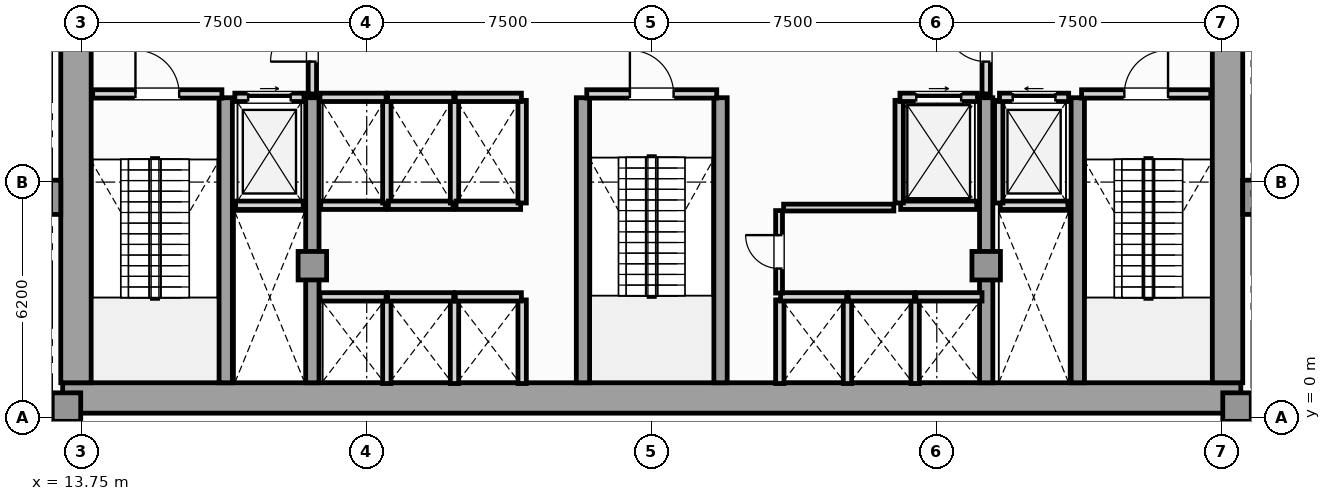
"""IFC4 building model, lengths in metres.
Left out: names, types, materials, properties, quantities, classifications, styles, units other than length and angle.
Written with IfcOpenShell. Run it as: python <this file> out.ifc"""

import sys

from ifc_helpers import new_model, si_unit, direction, frame, frame_2d, origin, origin_2d, place, context, subcontext, project, spatial, rectangle, extrude, element, fill, save


model = new_model("IFC4")
c1 = context("Model", 3, precision=1e-05, world=origin(), true_north=direction((0.0, 1.0)))
c2 = subcontext(c1, "Body", "Model", "MODEL_VIEW")
j1 = project(units=[si_unit("LENGTHUNIT", "METRE"), si_unit("PLANEANGLEUNIT", "RADIAN")], contexts=[c1])
p1 = place(None, origin())
s1 = spatial("IfcSite", under=j1, at=p1, CompositionType="ELEMENT")
p2 = place(p1, origin())
s2 = spatial("IfcBuilding", under=s1, at=p2, CompositionType="ELEMENT")
p3 = place(p2, frame((0.0, 0.0, 24.6)))
s3 = spatial("IfcBuildingStorey", under=s2, at=p3, CompositionType="ELEMENT", Elevation=24.6)
p4 = place(p3, frame((13.25, 0.52, 0.0), z_axis=(0.0, 0.0, 1.0), x_axis=(1.0, 0.0, 0.0)))
e1 = element("IfcWall", 1, at=p4, inside=s3, PredefinedType="SHEAR", context=c2, shape_type="SweptSolid", body=[
    extrude(rectangle(XDim=31.0, YDim=0.8, at=frame_2d((15.5, 0.0))), origin(), (0.0, 0.0, 1.0), 4.95),
])
for number, where, z_axis, x_axis in (
    (2, (13.6, 0.92, 0.0), (0.0, 0.0, 1.0), (0.0, 1.0, 0.0)),
    (3, (43.9, 0.92, 0.0), (0.0, 0.0, 1.0), (0.0, 1.0, 0.0)),
):
    element("IfcWall", number, at=place(p3, frame(where, z_axis=z_axis, x_axis=x_axis)), inside=s3, PredefinedType="SHEAR", context=c2, shape_type="SweptSolid", body=[
        extrude(rectangle(XDim=10.53, YDim=0.8, at=frame_2d((5.265, 0.0))), origin(), (0.0, 0.0, 1.0), 4.95),
    ])
for number, where, z_axis, x_axis in (
    (4, (17.54, 0.92, 0.0), (0.0, 0.0, 1.0), (0.0, 1.0, 0.0)),
    (5, (19.82, 0.92, 0.0), (0.0, 0.0, 1.0), (0.0, 1.0, 0.0)),
    (6, (26.94, 0.92, 0.0), (0.0, 0.0, 1.0), (0.0, 1.0, 0.0)),
    (7, (30.56, 0.92, 0.0), (0.0, 0.0, 1.0), (0.0, 1.0, 0.0)),
    (8, (37.55, 0.92, 0.0), (0.0, 0.0, 1.0), (0.0, 1.0, 0.0)),
    (9, (39.96, 0.92, 0.0), (0.0, 0.0, 1.0), (0.0, 1.0, 0.0)),
):
    element("IfcWall", number, at=place(p3, frame(where, z_axis=z_axis, x_axis=x_axis)), inside=s3, PredefinedType="SHEAR", context=c2, shape_type="SweptSolid", body=[
        extrude(rectangle(XDim=7.5, YDim=0.35, at=frame_2d((3.75, 0.0))), origin(), (0.0, 0.0, 1.0), 4.95),
    ])
for number, where, z_axis, x_axis in (
    (10, (12.9, 5.8, 0.0), (0.0, 0.0, 1.0), (1.0, 0.0, 0.0)),
    (11, (44.6, 5.8, 0.0), (0.0, 0.0, 1.0), (1.0, 0.0, 0.0)),
):
    element("IfcColumn", number, at=place(p3, frame(where, z_axis=z_axis, x_axis=x_axis)), inside=s3, PredefinedType="PILASTER", context=c2, shape_type="SweptSolid", body=[
        extrude(rectangle(XDim=0.6, YDim=0.9, at=origin_2d()), origin(), (0.0, 0.0, 1.0), 5.2),
    ])
for number, where, z_axis, x_axis in (
    (12, (13.35, 0.28, 0.0), (0.0, 0.0, 1.0), (1.0, 0.0, 0.0)),
    (13, (44.15, 0.28, 0.0), (0.0, 0.0, 1.0), (1.0, 0.0, 0.0)),
    (14, (19.82, 4.0, 0.0), (0.0, 0.0, 1.0), (1.0, 0.0, 0.0)),
    (15, (37.55, 4.0, 0.0), (0.0, 0.0, 1.0), (1.0, 0.0, 0.0)),
):
    element("IfcColumn", number, at=place(p3, frame(where, z_axis=z_axis, x_axis=x_axis)), inside=s3, PredefinedType="COLUMN", context=c2, shape_type="SweptSolid", body=[
        extrude(rectangle(XDim=0.75, YDim=0.75, at=origin_2d()), origin(), (0.0, 0.0, 1.0), 5.2),
    ])
p5 = place(p3, frame((17.8, 5.59, 0.0), z_axis=(0.0, 0.0, 1.0), x_axis=(1.0, 0.0, 0.0)))
e16 = element("IfcWall", 16, at=p5, inside=s3, PredefinedType="SOLIDWALL", context=c2, shape_type="SweptSolid", body=[
    extrude(rectangle(XDim=1.78, YDim=0.22, at=frame_2d((0.89, 0.0))), origin(), (0.0, 0.0, 1.0), 4.95),
])
p6 = place(p3, frame((17.78, 8.43, 0.0), z_axis=(0.0, 0.0, 1.0), x_axis=(1.0, 0.0, 0.0)))
e17 = element("IfcWall", 17, at=p6, inside=s3, PredefinedType="SOLIDWALL", context=c2, shape_type="SweptSolid", body=[
    extrude(rectangle(XDim=1.82, YDim=0.22, at=frame_2d((0.91, 0.0))), origin(), (0.0, 0.0, 1.0), 4.95),
])
p7 = place(p6, frame((0.35, 0.0, 0.0)))
e18 = element("IfcOpeningElement", 18, at=p7, cuts=e17, PredefinedType="OPENING", context=c2, shape_type="SweptSolid", body=[
    extrude(rectangle(XDim=1.12, YDim=2.25, at=frame_2d((0.56, 1.125))), frame((0.0, 0.12, 0.0), z_axis=(0.0, -1.0, 0.0), x_axis=(1.0, 0.0, 0.0)), (0.0, 0.0, 1.0), 0.24),
])
p8 = place(p3, frame((37.92, 5.59, 0.0), z_axis=(0.0, 0.0, 1.0), x_axis=(1.0, 0.0, 0.0)))
e19 = element("IfcWall", 19, at=p8, inside=s3, PredefinedType="SOLIDWALL", context=c2, shape_type="SweptSolid", body=[
    extrude(rectangle(XDim=1.78, YDim=0.22, at=frame_2d((0.89, 0.0))), origin(), (0.0, 0.0, 1.0), 4.95),
])
p9 = place(p3, frame((37.88, 5.65, 0.0), z_axis=(0.0, 0.0, 1.0), x_axis=(0.0, 1.0, 0.0)))
e20 = element("IfcWall", 20, at=p9, inside=s3, PredefinedType="SOLIDWALL", context=c2, shape_type="SweptSolid", body=[
    extrude(rectangle(XDim=2.7, YDim=0.22, at=frame_2d((1.35, 0.0))), origin(), (0.0, 0.0, 1.0), 4.95),
])
p10 = place(p3, frame((37.9, 8.43, 0.0), z_axis=(0.0, 0.0, 1.0), x_axis=(1.0, 0.0, 0.0)))
e21 = element("IfcWall", 21, at=p10, inside=s3, PredefinedType="SOLIDWALL", context=c2, shape_type="SweptSolid", body=[
    extrude(rectangle(XDim=1.82, YDim=0.22, at=frame_2d((0.91, 0.0))), origin(), (0.0, 0.0, 1.0), 4.95),
])
p11 = place(p10, frame((0.35, 0.0, 0.0)))
e22 = element("IfcOpeningElement", 22, at=p11, cuts=e21, PredefinedType="OPENING", context=c2, shape_type="SweptSolid", body=[
    extrude(rectangle(XDim=1.12, YDim=2.25, at=frame_2d((0.56, 1.125))), frame((0.0, 0.12, 0.0), z_axis=(0.0, -1.0, 0.0), x_axis=(1.0, 0.0, 0.0)), (0.0, 0.0, 1.0), 0.24),
])
p12 = place(p3, frame((35.3, 5.59, 0.0), z_axis=(0.0, 0.0, 1.0), x_axis=(1.0, 0.0, 0.0)))
e23 = element("IfcWall", 23, at=p12, inside=s3, PredefinedType="SOLIDWALL", context=c2, shape_type="SweptSolid", body=[
    extrude(rectangle(XDim=2.0, YDim=0.22, at=frame_2d((1.0, 0.0))), origin(), (0.0, 0.0, 1.0), 4.95),
])
p13 = place(p3, frame((35.26, 5.65, 0.0), z_axis=(0.0, 0.0, 1.0), x_axis=(0.0, 1.0, 0.0)))
e24 = element("IfcWall", 24, at=p13, inside=s3, PredefinedType="SOLIDWALL", context=c2, shape_type="SweptSolid", body=[
    extrude(rectangle(XDim=2.7, YDim=0.22, at=frame_2d((1.35, 0.0))), origin(), (0.0, 0.0, 1.0), 4.95),
])
p14 = place(p3, frame((35.28, 8.43, 0.0), z_axis=(0.0, 0.0, 1.0), x_axis=(1.0, 0.0, 0.0)))
e25 = element("IfcWall", 25, at=p14, inside=s3, PredefinedType="SOLIDWALL", context=c2, shape_type="SweptSolid", body=[
    extrude(rectangle(XDim=2.04, YDim=0.22, at=frame_2d((1.02, 0.0))), origin(), (0.0, 0.0, 1.0), 4.95),
])
p15 = place(p14, frame((0.43, 0.0, 0.0)))
e26 = element("IfcOpeningElement", 26, at=p15, cuts=e25, PredefinedType="OPENING", context=c2, shape_type="SweptSolid", body=[
    extrude(rectangle(XDim=1.18, YDim=2.2, at=frame_2d((0.59, 1.1))), frame((0.0, 0.12, 0.0), z_axis=(0.0, -1.0, 0.0), x_axis=(1.0, 0.0, 0.0)), (0.0, 0.0, 1.0), 0.24),
])
p16 = place(p3, frame((21.78, 0.9, 0.0), z_axis=(0.0, 0.0, 1.0), x_axis=(0.0, 1.0, 0.0)))
e27 = element("IfcWall", 27, at=p16, inside=s3, PredefinedType="SOLIDWALL", context=c2, shape_type="SweptSolid", body=[
    extrude(rectangle(XDim=2.2, YDim=0.22, at=frame_2d((1.1, 0.0))), origin(), (0.0, 0.0, 1.0), 4.95),
])
p17 = place(p3, frame((20.02, 3.18, 0.0), z_axis=(0.0, 0.0, 1.0), x_axis=(1.0, 0.0, 0.0)))
e28 = element("IfcWall", 28, at=p17, inside=s3, PredefinedType="SOLIDWALL", context=c2, shape_type="SweptSolid", body=[
    extrude(rectangle(XDim=1.74, YDim=0.22, at=frame_2d((0.87, 0.0))), origin(), (0.0, 0.0, 1.0), 4.95),
])
p18 = place(p3, frame((23.56, 0.9, 0.0), z_axis=(0.0, 0.0, 1.0), x_axis=(0.0, 1.0, 0.0)))
e29 = element("IfcWall", 29, at=p18, inside=s3, PredefinedType="SOLIDWALL", context=c2, shape_type="SweptSolid", body=[
    extrude(rectangle(XDim=2.2, YDim=0.22, at=frame_2d((1.1, 0.0))), origin(), (0.0, 0.0, 1.0), 4.95),
])
p19 = place(p3, frame((21.8, 3.18, 0.0), z_axis=(0.0, 0.0, 1.0), x_axis=(1.0, 0.0, 0.0)))
e30 = element("IfcWall", 30, at=p19, inside=s3, PredefinedType="SOLIDWALL", context=c2, shape_type="SweptSolid", body=[
    extrude(rectangle(XDim=1.74, YDim=0.22, at=frame_2d((0.87, 0.0))), origin(), (0.0, 0.0, 1.0), 4.95),
])
p20 = place(p3, frame((25.34, 0.9, 0.0), z_axis=(0.0, 0.0, 1.0), x_axis=(0.0, 1.0, 0.0)))
e31 = element("IfcWall", 31, at=p20, inside=s3, PredefinedType="SOLIDWALL", context=c2, shape_type="SweptSolid", body=[
    extrude(rectangle(XDim=2.2, YDim=0.22, at=frame_2d((1.1, 0.0))), origin(), (0.0, 0.0, 1.0), 4.95),
])
p21 = place(p3, frame((23.58, 3.18, 0.0), z_axis=(0.0, 0.0, 1.0), x_axis=(1.0, 0.0, 0.0)))
e32 = element("IfcWall", 32, at=p21, inside=s3, PredefinedType="SOLIDWALL", context=c2, shape_type="SweptSolid", body=[
    extrude(rectangle(XDim=1.74, YDim=0.22, at=frame_2d((0.87, 0.0))), origin(), (0.0, 0.0, 1.0), 4.95),
])
for number, where, z_axis, x_axis in (
    (33, (32.12, 0.9, 0.0), (0.0, 0.0, 1.0), (0.0, 1.0, 0.0)),
    (34, (33.9, 0.9, 0.0), (0.0, 0.0, 1.0), (0.0, 1.0, 0.0)),
):
    element("IfcWall", number, at=place(p3, frame(where, z_axis=z_axis, x_axis=x_axis)), inside=s3, PredefinedType="SOLIDWALL", context=c2, shape_type="SweptSolid", body=[
        extrude(rectangle(XDim=2.2, YDim=0.22, at=frame_2d((1.1, 0.0))), origin(), (0.0, 0.0, 1.0), 4.95),
    ])
p22 = place(p3, frame((32.14, 3.18, 0.0), z_axis=(0.0, 0.0, 1.0), x_axis=(1.0, 0.0, 0.0)))
e35 = element("IfcWall", 35, at=p22, inside=s3, PredefinedType="SOLIDWALL", context=c2, shape_type="SweptSolid", body=[
    extrude(rectangle(XDim=1.74, YDim=0.22, at=frame_2d((0.87, 0.0))), origin(), (0.0, 0.0, 1.0), 4.95),
])
p23 = place(p3, frame((35.68, 0.9, 0.0), z_axis=(0.0, 0.0, 1.0), x_axis=(0.0, 1.0, 0.0)))
e36 = element("IfcWall", 36, at=p23, inside=s3, PredefinedType="SOLIDWALL", context=c2, shape_type="SweptSolid", body=[
    extrude(rectangle(XDim=2.2, YDim=0.22, at=frame_2d((1.1, 0.0))), origin(), (0.0, 0.0, 1.0), 4.95),
])
for number, where, z_axis, x_axis in (
    (37, (33.92, 3.18, 0.0), (0.0, 0.0, 1.0), (1.0, 0.0, 0.0)),
    (38, (35.7, 3.18, 0.0), (0.0, 0.0, 1.0), (1.0, 0.0, 0.0)),
):
    element("IfcWall", number, at=place(p3, frame(where, z_axis=z_axis, x_axis=x_axis)), inside=s3, PredefinedType="SOLIDWALL", context=c2, shape_type="SweptSolid", body=[
        extrude(rectangle(XDim=1.74, YDim=0.22, at=frame_2d((0.87, 0.0))), origin(), (0.0, 0.0, 1.0), 4.95),
    ])
p24 = place(p3, frame((20.04, 5.59, 0.0), z_axis=(0.0, 0.0, 1.0), x_axis=(1.0, 0.0, 0.0)))
e39 = element("IfcWall", 39, at=p24, inside=s3, PredefinedType="SOLIDWALL", context=c2, shape_type="SweptSolid", body=[
    extrude(rectangle(XDim=1.7, YDim=0.22, at=frame_2d((0.85, 0.0))), origin(), (0.0, 0.0, 1.0), 4.95),
])
p25 = place(p3, frame((21.78, 5.65, 0.0), z_axis=(0.0, 0.0, 1.0), x_axis=(0.0, 1.0, 0.0)))
e40 = element("IfcWall", 40, at=p25, inside=s3, PredefinedType="SOLIDWALL", context=c2, shape_type="SweptSolid", body=[
    extrude(rectangle(XDim=2.7, YDim=0.22, at=frame_2d((1.35, 0.0))), origin(), (0.0, 0.0, 1.0), 4.95),
])
p26 = place(p3, frame((20.02, 8.43, 0.0), z_axis=(0.0, 0.0, 1.0), x_axis=(1.0, 0.0, 0.0)))
e41 = element("IfcWall", 41, at=p26, inside=s3, PredefinedType="SOLIDWALL", context=c2, shape_type="SweptSolid", body=[
    extrude(rectangle(XDim=1.74, YDim=0.22, at=frame_2d((0.87, 0.0))), origin(), (0.0, 0.0, 1.0), 4.95),
])
p27 = place(p3, frame((21.82, 5.59, 0.0), z_axis=(0.0, 0.0, 1.0), x_axis=(1.0, 0.0, 0.0)))
e42 = element("IfcWall", 42, at=p27, inside=s3, PredefinedType="SOLIDWALL", context=c2, shape_type="SweptSolid", body=[
    extrude(rectangle(XDim=1.7, YDim=0.22, at=frame_2d((0.85, 0.0))), origin(), (0.0, 0.0, 1.0), 4.95),
])
p28 = place(p3, frame((23.56, 5.65, 0.0), z_axis=(0.0, 0.0, 1.0), x_axis=(0.0, 1.0, 0.0)))
e43 = element("IfcWall", 43, at=p28, inside=s3, PredefinedType="SOLIDWALL", context=c2, shape_type="SweptSolid", body=[
    extrude(rectangle(XDim=2.7, YDim=0.22, at=frame_2d((1.35, 0.0))), origin(), (0.0, 0.0, 1.0), 4.95),
])
p29 = place(p3, frame((21.8, 8.43, 0.0), z_axis=(0.0, 0.0, 1.0), x_axis=(1.0, 0.0, 0.0)))
e44 = element("IfcWall", 44, at=p29, inside=s3, PredefinedType="SOLIDWALL", context=c2, shape_type="SweptSolid", body=[
    extrude(rectangle(XDim=1.74, YDim=0.22, at=frame_2d((0.87, 0.0))), origin(), (0.0, 0.0, 1.0), 4.95),
])
p30 = place(p3, frame((23.6, 5.59, 0.0), z_axis=(0.0, 0.0, 1.0), x_axis=(1.0, 0.0, 0.0)))
e45 = element("IfcWall", 45, at=p30, inside=s3, PredefinedType="SOLIDWALL", context=c2, shape_type="SweptSolid", body=[
    extrude(rectangle(XDim=1.7, YDim=0.22, at=frame_2d((0.85, 0.0))), origin(), (0.0, 0.0, 1.0), 4.95),
])
p31 = place(p3, frame((25.34, 5.65, 0.0), z_axis=(0.0, 0.0, 1.0), x_axis=(0.0, 1.0, 0.0)))
e46 = element("IfcWall", 46, at=p31, inside=s3, PredefinedType="SOLIDWALL", context=c2, shape_type="SweptSolid", body=[
    extrude(rectangle(XDim=2.7, YDim=0.22, at=frame_2d((1.35, 0.0))), origin(), (0.0, 0.0, 1.0), 4.95),
])
p32 = place(p3, frame((23.58, 8.43, 0.0), z_axis=(0.0, 0.0, 1.0), x_axis=(1.0, 0.0, 0.0)))
e47 = element("IfcWall", 47, at=p32, inside=s3, PredefinedType="SOLIDWALL", context=c2, shape_type="SweptSolid", body=[
    extrude(rectangle(XDim=1.74, YDim=0.22, at=frame_2d((0.87, 0.0))), origin(), (0.0, 0.0, 1.0), 4.95),
])
p33 = place(p3, frame((14.04, 8.52, 0.0), z_axis=(0.0, 0.0, 1.0), x_axis=(1.0, 0.0, 0.0)))
e48 = element("IfcWall", 48, at=p33, inside=s3, PredefinedType="SOLIDWALL", context=c2, shape_type="SweptSolid", body=[
    extrude(rectangle(XDim=3.4, YDim=0.22, at=frame_2d((1.7, 0.0))), origin(), (0.0, 0.0, 1.0), 4.95),
])
p34 = place(p33, frame((1.125, 0.0, 0.0)))
e49 = element("IfcOpeningElement", 49, at=p34, cuts=e48, PredefinedType="OPENING", context=c2, shape_type="SweptSolid", body=[
    extrude(rectangle(XDim=1.15, YDim=2.2, at=frame_2d((0.575, 1.1))), frame((0.0, 0.12, 0.0), z_axis=(0.0, -1.0, 0.0), x_axis=(1.0, 0.0, 0.0)), (0.0, 0.0, 1.0), 0.24),
])
p35 = place(p3, frame((40.06, 8.52, 0.0), z_axis=(0.0, 0.0, 1.0), x_axis=(1.0, 0.0, 0.0)))
e50 = element("IfcWall", 50, at=p35, inside=s3, PredefinedType="SOLIDWALL", context=c2, shape_type="SweptSolid", body=[
    extrude(rectangle(XDim=3.4, YDim=0.22, at=frame_2d((1.7, 0.0))), origin(), (0.0, 0.0, 1.0), 4.95),
])
p36 = place(p35, frame((1.125, 0.0, 0.0)))
e51 = element("IfcOpeningElement", 51, at=p36, cuts=e50, PredefinedType="OPENING", context=c2, shape_type="SweptSolid", body=[
    extrude(rectangle(XDim=1.15, YDim=2.2, at=frame_2d((0.575, 1.1))), frame((0.0, 0.12, 0.0), z_axis=(0.0, -1.0, 0.0), x_axis=(1.0, 0.0, 0.0)), (0.0, 0.0, 1.0), 0.24),
])
p37 = place(p3, frame((27.04, 8.52, 0.0), z_axis=(0.0, 0.0, 1.0), x_axis=(1.0, 0.0, 0.0)))
e52 = element("IfcWall", 52, at=p37, inside=s3, PredefinedType="SOLIDWALL", context=c2, shape_type="SweptSolid", body=[
    extrude(rectangle(XDim=3.42, YDim=0.22, at=frame_2d((1.71, 0.0))), origin(), (0.0, 0.0, 1.0), 4.95),
])
p38 = place(p37, frame((1.135, 0.0, 0.0)))
e53 = element("IfcOpeningElement", 53, at=p38, cuts=e52, PredefinedType="OPENING", context=c2, shape_type="SweptSolid", body=[
    extrude(rectangle(XDim=1.15, YDim=2.2, at=frame_2d((0.575, 1.1))), frame((0.0, 0.12, 0.0), z_axis=(0.0, -1.0, 0.0), x_axis=(1.0, 0.0, 0.0)), (0.0, 0.0, 1.0), 0.24),
])
p39 = place(p3, frame((19.82, 8.52, 0.0), z_axis=(0.0, 0.0, 1.0), x_axis=(0.0, 1.0, 0.0)))
e54 = element("IfcWall", 54, at=p39, inside=s3, PredefinedType="SOLIDWALL", context=c2, shape_type="SweptSolid", body=[
    extrude(rectangle(XDim=2.8, YDim=0.22, at=frame_2d((1.4, 0.0))), origin(), (0.0, 0.0, 1.0), 4.406),
])
p40 = place(p39, frame((0.85, 0.0, 0.0)))
e55 = element("IfcOpeningElement", 55, at=p40, cuts=e54, PredefinedType="OPENING", context=c2, shape_type="SweptSolid", body=[
    extrude(rectangle(XDim=1.1, YDim=2.2, at=frame_2d((0.55, 1.1))), frame((0.0, 0.12, 0.0), z_axis=(0.0, -1.0, 0.0), x_axis=(1.0, 0.0, 0.0)), (0.0, 0.0, 1.0), 0.24),
])
p41 = place(p3, frame((37.55, 8.52, 0.0), z_axis=(0.0, 0.0, 1.0), x_axis=(0.0, 1.0, 0.0)))
e56 = element("IfcWall", 56, at=p41, inside=s3, PredefinedType="SOLIDWALL", context=c2, shape_type="SweptSolid", body=[
    extrude(rectangle(XDim=2.8, YDim=0.22, at=frame_2d((1.4, 0.0))), origin(), (0.0, 0.0, 1.0), 4.406),
])
p42 = place(p41, frame((0.85, 0.0, 0.0)))
e57 = element("IfcOpeningElement", 57, at=p42, cuts=e56, PredefinedType="OPENING", context=c2, shape_type="SweptSolid", body=[
    extrude(rectangle(XDim=1.1, YDim=2.2, at=frame_2d((0.55, 1.1))), frame((0.0, 0.12, 0.0), z_axis=(0.0, -1.0, 0.0), x_axis=(1.0, 0.0, 0.0)), (0.0, 0.0, 1.0), 0.24),
])
p43 = place(p3, frame((32.1, 3.28, 0.0), z_axis=(0.0, 0.0, 1.0), x_axis=(0.0, 1.0, 0.0)))
e58 = element("IfcWall", 58, at=p43, inside=s3, PredefinedType="PARTITIONING", context=c2, shape_type="SweptSolid", body=[
    extrude(rectangle(XDim=2.17, YDim=0.18, at=frame_2d((1.085, 0.0))), origin(), (0.0, 0.0, 1.0), 4.95),
])
p44 = place(p43, frame((0.645, 0.0, 0.0)))
e59 = element("IfcOpeningElement", 59, at=p44, cuts=e58, PredefinedType="OPENING", context=c2, shape_type="SweptSolid", body=[
    extrude(rectangle(XDim=0.88, YDim=2.05, at=frame_2d((0.44, 1.025))), frame((0.0, 0.1, 0.0), z_axis=(0.0, -1.0, 0.0), x_axis=(1.0, 0.0, 0.0)), (0.0, 0.0, 1.0), 0.2),
])
p45 = place(p3, frame((32.22, 5.53, 0.0), z_axis=(0.0, 0.0, 1.0), x_axis=(1.0, 0.0, 0.0)))
e60 = element("IfcWall", 60, at=p45, inside=s3, PredefinedType="PARTITIONING", context=c2, shape_type="SweptSolid", body=[
    extrude(rectangle(XDim=2.9, YDim=0.18, at=frame_2d((1.45, 0.0))), origin(), (0.0, 0.0, 1.0), 4.95),
])
p46 = place(p7, origin())
e61 = element("IfcDoor", 61, at=p46, inside=s3, OperationType="SLIDING_TO_RIGHT", PredefinedType="DOOR", context=c2, shape_type="SweptSolid", body=[
    extrude(rectangle(XDim=1.12, YDim=2.25, at=frame_2d((0.56, 1.125))), frame((0.0, 0.025, 0.0), z_axis=(0.0, -1.0, 0.0), x_axis=(1.0, 0.0, 0.0)), (0.0, 0.0, 1.0), 0.05),
])
fill(e18, e61)
p47 = place(p11, origin())
e62 = element("IfcDoor", 62, at=p47, inside=s3, OperationType="SLIDING_TO_LEFT", PredefinedType="DOOR", context=c2, shape_type="SweptSolid", body=[
    extrude(rectangle(XDim=1.12, YDim=2.25, at=frame_2d((0.56, 1.125))), frame((0.0, 0.025, 0.0), z_axis=(0.0, -1.0, 0.0), x_axis=(1.0, 0.0, 0.0)), (0.0, 0.0, 1.0), 0.05),
])
fill(e22, e62)
p48 = place(p15, origin())
e63 = element("IfcDoor", 63, at=p48, inside=s3, OperationType="SLIDING_TO_RIGHT", PredefinedType="DOOR", context=c2, shape_type="SweptSolid", body=[
    extrude(rectangle(XDim=1.18, YDim=2.2, at=frame_2d((0.59, 1.1))), frame((0.0, 0.025, 0.0), z_axis=(0.0, -1.0, 0.0), x_axis=(1.0, 0.0, 0.0)), (0.0, 0.0, 1.0), 0.05),
])
fill(e26, e63)
p49 = place(p34, origin())
e64 = element("IfcDoor", 64, at=p49, inside=s3, OperationType="SINGLE_SWING_LEFT", PredefinedType="DOOR", context=c2, shape_type="SweptSolid", body=[
    extrude(rectangle(XDim=1.15, YDim=2.2, at=frame_2d((0.575, 1.1))), frame((0.0, 0.025, 0.0), z_axis=(0.0, -1.0, 0.0), x_axis=(1.0, 0.0, 0.0)), (0.0, 0.0, 1.0), 0.05),
])
fill(e49, e64)
p50 = place(p36, origin())
e65 = element("IfcDoor", 65, at=p50, inside=s3, OperationType="SINGLE_SWING_RIGHT", PredefinedType="DOOR", context=c2, shape_type="SweptSolid", body=[
    extrude(rectangle(XDim=1.15, YDim=2.2, at=frame_2d((0.575, 1.1))), frame((0.0, 0.025, 0.0), z_axis=(0.0, -1.0, 0.0), x_axis=(1.0, 0.0, 0.0)), (0.0, 0.0, 1.0), 0.05),
])
fill(e51, e65)
p51 = place(p38, origin())
e66 = element("IfcDoor", 66, at=p51, inside=s3, OperationType="SINGLE_SWING_LEFT", PredefinedType="DOOR", context=c2, shape_type="SweptSolid", body=[
    extrude(rectangle(XDim=1.15, YDim=2.2, at=frame_2d((0.575, 1.1))), frame((0.0, 0.025, 0.0), z_axis=(0.0, -1.0, 0.0), x_axis=(1.0, 0.0, 0.0)), (0.0, 0.0, 1.0), 0.05),
])
fill(e53, e66)
p52 = place(p40, origin())
e67 = element("IfcDoor", 67, at=p52, inside=s3, OperationType="SINGLE_SWING_LEFT", PredefinedType="DOOR", context=c2, shape_type="SweptSolid", body=[
    extrude(rectangle(XDim=1.1, YDim=2.2, at=frame_2d((0.55, 1.1))), frame((0.0, 0.025, 0.0), z_axis=(0.0, -1.0, 0.0), x_axis=(1.0, 0.0, 0.0)), (0.0, 0.0, 1.0), 0.05),
])
fill(e55, e67)
p53 = place(p42, origin())
e68 = element("IfcDoor", 68, at=p53, inside=s3, OperationType="SINGLE_SWING_RIGHT", PredefinedType="DOOR", context=c2, shape_type="SweptSolid", body=[
    extrude(rectangle(XDim=1.1, YDim=2.2, at=frame_2d((0.55, 1.1))), frame((0.0, 0.025, 0.0), z_axis=(0.0, -1.0, 0.0), x_axis=(1.0, 0.0, 0.0)), (0.0, 0.0, 1.0), 0.05),
])
fill(e57, e68)
p54 = place(p44, origin())
e69 = element("IfcDoor", 69, at=p54, inside=s3, OperationType="SINGLE_SWING_RIGHT", PredefinedType="DOOR", context=c2, shape_type="SweptSolid", body=[
    extrude(rectangle(XDim=0.88, YDim=2.05, at=frame_2d((0.44, 1.025))), frame((0.0, 0.025, 0.0), z_axis=(0.0, -1.0, 0.0), x_axis=(1.0, 0.0, 0.0)), (0.0, 0.0, 1.0), 0.05),
])
fill(e59, e69)
save(model, sys.argv[1])
